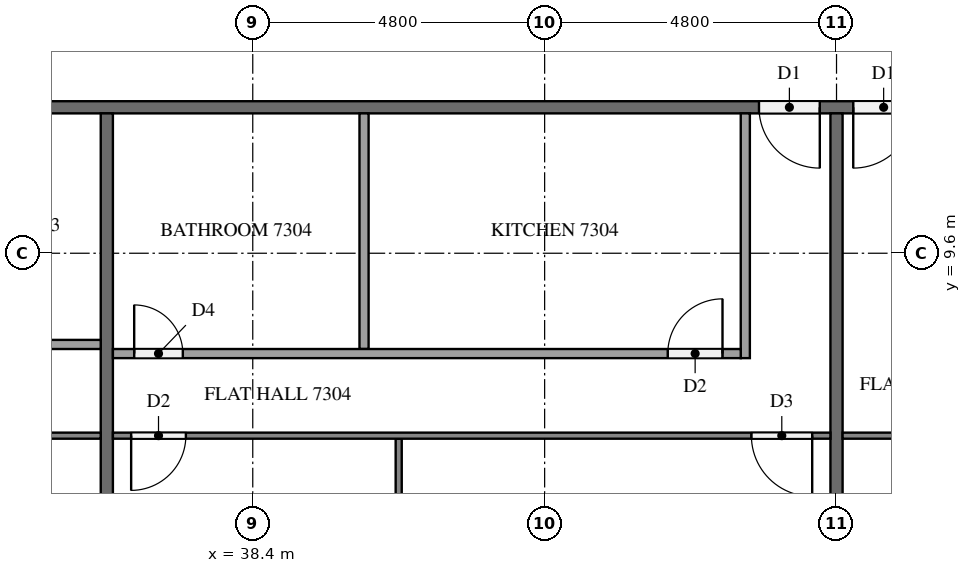
"""IFC4 building model, lengths in metres.
Left out: names, types, materials, properties, quantities, classifications, styles, units other than length and angle.
Written with IfcOpenShell. Run it as: python <this file> out.ifc"""

import sys

from ifc_helpers import new_model, si_unit, direction, frame, frame_2d, origin, place, context, subcontext, project, spatial, rectangle, extrude, element, fill, save


model = new_model("IFC4")
c1 = context("Model", 3, precision=1e-05, world=origin(), true_north=direction((0.0, 1.0)))
c2 = subcontext(c1, "Body", "Model", "MODEL_VIEW")
j1 = project(units=[si_unit("LENGTHUNIT", "METRE"), si_unit("PLANEANGLEUNIT", "RADIAN")], contexts=[c1])
p1 = place(None, origin())
s1 = spatial("IfcSite", under=j1, at=p1, CompositionType="ELEMENT")
p2 = place(p1, origin())
s2 = spatial("IfcBuilding", under=s1, at=p2, CompositionType="ELEMENT")
p3 = place(p2, frame((0.0, 0.0, 279.1)))
s3 = spatial("IfcBuildingStorey", under=s2, at=p3, CompositionType="ELEMENT", Elevation=279.1)
p4 = place(p3, frame((50.5, 12.0, 0.0), z_axis=(0.0, 0.0, 1.0), x_axis=(-1.0, 0.0, 0.0)))
e1 = element("IfcWall", 1, at=p4, inside=s3, PredefinedType="PARTITIONING", context=c2, shape_type="SweptSolid", body=[
    extrude(rectangle(XDim=38.6, YDim=0.2, at=frame_2d((19.3, 0.0))), origin(), (0.0, 0.0, 1.0), 3.2),
])
p5 = place(p4, frame((36.375, 0.0, 0.0)))
e2 = element("IfcOpeningElement", 2, at=p5, cuts=e1, PredefinedType="OPENING", context=c2, shape_type="SweptSolid", body=[
    extrude(rectangle(XDim=1.0, YDim=2.1, at=frame_2d((0.5, 1.05))), frame((0.0, 0.11, 0.0), z_axis=(0.0, -1.0, 0.0), x_axis=(1.0, 0.0, 0.0)), (0.0, 0.0, 1.0), 0.22),
])
p6 = place(p4, frame((29.175, 0.0, 0.0)))
e3 = element("IfcOpeningElement", 3, at=p6, cuts=e1, PredefinedType="OPENING", context=c2, shape_type="SweptSolid", body=[
    extrude(rectangle(XDim=1.0, YDim=2.1, at=frame_2d((0.5, 1.05))), frame((0.0, 0.11, 0.0), z_axis=(0.0, -1.0, 0.0), x_axis=(1.0, 0.0, 0.0)), (0.0, 0.0, 1.0), 0.22),
])
p7 = place(p4, frame((27.625, 0.0, 0.0)))
e4 = element("IfcOpeningElement", 4, at=p7, cuts=e1, PredefinedType="OPENING", context=c2, shape_type="SweptSolid", body=[
    extrude(rectangle(XDim=1.0, YDim=2.1, at=frame_2d((0.5, 1.05))), frame((0.0, 0.11, 0.0), z_axis=(0.0, -1.0, 0.0), x_axis=(1.0, 0.0, 0.0)), (0.0, 0.0, 1.0), 0.22),
])
p8 = place(p4, frame((2.775, 0.0, 0.0)))
e5 = element("IfcOpeningElement", 5, at=p8, cuts=e1, PredefinedType="OPENING", context=c2, shape_type="SweptSolid", body=[
    extrude(rectangle(XDim=1.0, YDim=2.1, at=frame_2d((0.5, 1.05))), frame((0.0, 0.11, 0.0), z_axis=(0.0, -1.0, 0.0), x_axis=(1.0, 0.0, 0.0)), (0.0, 0.0, 1.0), 0.22),
])
p9 = place(p4, frame((1.225, 0.0, 0.0)))
e6 = element("IfcOpeningElement", 6, at=p9, cuts=e1, PredefinedType="OPENING", context=c2, shape_type="SweptSolid", body=[
    extrude(rectangle(XDim=1.0, YDim=2.1, at=frame_2d((0.5, 1.05))), frame((0.0, 0.11, 0.0), z_axis=(0.0, -1.0, 0.0), x_axis=(1.0, 0.0, 0.0)), (0.0, 0.0, 1.0), 0.22),
])
for number, where, z_axis, x_axis in (
    (7, (36.0, 11.9, 0.0), (0.0, 0.0, 1.0), (0.0, -1.0, 0.0)),
    (8, (48.0, 11.9, 0.0), (0.0, 0.0, 1.0), (0.0, -1.0, 0.0)),
):
    element("IfcWall", number, at=place(p3, frame(where, z_axis=z_axis, x_axis=x_axis)), inside=s3, PredefinedType="PARTITIONING", context=c2, shape_type="SweptSolid", body=[
        extrude(rectangle(XDim=11.8, YDim=0.2, at=frame_2d((5.9, 0.0))), origin(), (0.0, 0.0, 1.0), 3.2),
    ])
p10 = place(p3, frame((35.9, 6.6, 0.0), z_axis=(0.0, 0.0, 1.0), x_axis=(-1.0, 0.0, 0.0)))
e9 = element("IfcWall", 9, at=p10, inside=s3, PredefinedType="PARTITIONING", context=c2, shape_type="SweptSolid", body=[
    extrude(rectangle(XDim=14.2, YDim=0.1, at=frame_2d((7.1, 0.0))), origin(), (0.0, 0.0, 1.0), 3.2),
])
p11 = place(p10, frame((13.0, 0.0, 0.0)))
e10 = element("IfcOpeningElement", 10, at=p11, cuts=e9, PredefinedType="OPENING", context=c2, shape_type="SweptSolid", body=[
    extrude(rectangle(XDim=0.9, YDim=2.1, at=frame_2d((0.45, 1.05))), frame((0.0, 0.06, 0.0), z_axis=(0.0, -1.0, 0.0), x_axis=(1.0, 0.0, 0.0)), (0.0, 0.0, 1.0), 0.12),
])
p12 = place(p10, frame((5.05, 0.0, 0.0)))
e11 = element("IfcOpeningElement", 11, at=p12, cuts=e9, PredefinedType="OPENING", context=c2, shape_type="SweptSolid", body=[
    extrude(rectangle(XDim=1.0, YDim=2.1, at=frame_2d((0.5, 1.05))), frame((0.0, 0.06, 0.0), z_axis=(0.0, -1.0, 0.0), x_axis=(1.0, 0.0, 0.0)), (0.0, 0.0, 1.0), 0.12),
])
p13 = place(p10, frame((3.45, 0.0, 0.0)))
e12 = element("IfcOpeningElement", 12, at=p13, cuts=e9, PredefinedType="OPENING", context=c2, shape_type="SweptSolid", body=[
    extrude(rectangle(XDim=0.9, YDim=2.1, at=frame_2d((0.45, 1.05))), frame((0.0, 0.06, 0.0), z_axis=(0.0, -1.0, 0.0), x_axis=(1.0, 0.0, 0.0)), (0.0, 0.0, 1.0), 0.12),
])
p14 = place(p3, frame((23.175, 8.1, 0.0), z_axis=(0.0, 0.0, 1.0), x_axis=(1.0, 0.0, 0.0)))
e13 = element("IfcWall", 13, at=p14, inside=s3, PredefinedType="PARTITIONING", context=c2, shape_type="SweptSolid", body=[
    extrude(rectangle(XDim=12.725, YDim=0.15, at=frame_2d((6.362, 0.0))), origin(), (0.0, 0.0, 1.0), 3.2),
])
p15 = place(p14, frame((0.3, 0.0, 0.0)))
e14 = element("IfcOpeningElement", 14, at=p15, cuts=e13, PredefinedType="OPENING", context=c2, shape_type="SweptSolid", body=[
    extrude(rectangle(XDim=0.8, YDim=2.1, at=frame_2d((0.4, 1.05))), frame((0.0, 0.085, 0.0), z_axis=(0.0, -1.0, 0.0), x_axis=(1.0, 0.0, 0.0)), (0.0, 0.0, 1.0), 0.17),
])
p16 = place(p14, frame((7.585, 0.0, 0.0)))
e15 = element("IfcOpeningElement", 15, at=p16, cuts=e13, PredefinedType="OPENING", context=c2, shape_type="SweptSolid", body=[
    extrude(rectangle(XDim=0.9, YDim=2.1, at=frame_2d((0.45, 1.05))), frame((0.0, 0.085, 0.0), z_axis=(0.0, -1.0, 0.0), x_axis=(1.0, 0.0, 0.0)), (0.0, 0.0, 1.0), 0.17),
])
p17 = place(p14, frame((9.135, 0.0, 0.0)))
e16 = element("IfcOpeningElement", 16, at=p17, cuts=e13, PredefinedType="OPENING", context=c2, shape_type="SweptSolid", body=[
    extrude(rectangle(XDim=0.9, YDim=2.1, at=frame_2d((0.45, 1.05))), frame((0.0, 0.085, 0.0), z_axis=(0.0, -1.0, 0.0), x_axis=(1.0, 0.0, 0.0)), (0.0, 0.0, 1.0), 0.17),
])
p18 = place(p3, frame((40.8, 6.55, 0.0), z_axis=(0.0, 0.0, 1.0), x_axis=(0.0, -1.0, 0.0)))
e17 = element("IfcWall", 17, at=p18, inside=s3, PredefinedType="PARTITIONING", context=c2, shape_type="SweptSolid", body=[
    extrude(rectangle(XDim=6.45, YDim=0.1, at=frame_2d((3.225, 0.0))), origin(), (0.0, 0.0, 1.0), 3.2),
])
p19 = place(p3, frame((47.9, 6.6, 0.0), z_axis=(0.0, 0.0, 1.0), x_axis=(-1.0, 0.0, 0.0)))
e18 = element("IfcWall", 18, at=p19, inside=s3, PredefinedType="PARTITIONING", context=c2, shape_type="SweptSolid", body=[
    extrude(rectangle(XDim=11.8, YDim=0.1, at=frame_2d((5.9, 0.0))), origin(), (0.0, 0.0, 1.0), 3.2),
])
p20 = place(p19, frame((0.3, 0.0, 0.0)))
e19 = element("IfcOpeningElement", 19, at=p20, cuts=e18, PredefinedType="OPENING", context=c2, shape_type="SweptSolid", body=[
    extrude(rectangle(XDim=1.0, YDim=2.1, at=frame_2d((0.5, 1.05))), frame((0.0, 0.06, 0.0), z_axis=(0.0, -1.0, 0.0), x_axis=(1.0, 0.0, 0.0)), (0.0, 0.0, 1.0), 0.12),
])
p21 = place(p19, frame((10.6, 0.0, 0.0)))
e20 = element("IfcOpeningElement", 20, at=p21, cuts=e18, PredefinedType="OPENING", context=c2, shape_type="SweptSolid", body=[
    extrude(rectangle(XDim=0.9, YDim=2.1, at=frame_2d((0.45, 1.05))), frame((0.0, 0.06, 0.0), z_axis=(0.0, -1.0, 0.0), x_axis=(1.0, 0.0, 0.0)), (0.0, 0.0, 1.0), 0.12),
])
p22 = place(p3, frame((40.23, 11.9, 0.0), z_axis=(0.0, 0.0, 1.0), x_axis=(0.0, -1.0, 0.0)))
e21 = element("IfcWall", 21, at=p22, inside=s3, PredefinedType="PARTITIONING", context=c2, shape_type="SweptSolid", body=[
    extrude(rectangle(XDim=3.875, YDim=0.15, at=frame_2d((1.938, 0.0))), origin(), (0.0, 0.0, 1.0), 3.2),
])
p23 = place(p3, frame((46.5, 11.9, 0.0), z_axis=(0.0, 0.0, 1.0), x_axis=(0.0, -1.0, 0.0)))
e22 = element("IfcWall", 22, at=p23, inside=s3, PredefinedType="PARTITIONING", context=c2, shape_type="SweptSolid", body=[
    extrude(rectangle(XDim=4.025, YDim=0.15, at=frame_2d((2.012, 0.0))), origin(), (0.0, 0.0, 1.0), 3.2),
])
p24 = place(p3, frame((36.1, 7.95, 0.0), z_axis=(0.0, 0.0, 1.0), x_axis=(1.0, 0.0, 0.0)))
e23 = element("IfcWall", 23, at=p24, inside=s3, PredefinedType="PARTITIONING", context=c2, shape_type="SweptSolid", body=[
    extrude(rectangle(XDim=10.325, YDim=0.15, at=frame_2d((5.163, 0.0))), origin(), (0.0, 0.0, 1.0), 3.2),
])
p25 = place(p24, frame((9.125, 0.0, 0.0)))
e24 = element("IfcOpeningElement", 24, at=p25, cuts=e23, PredefinedType="OPENING", context=c2, shape_type="SweptSolid", body=[
    extrude(rectangle(XDim=0.9, YDim=2.1, at=frame_2d((0.45, 1.05))), frame((0.0, 0.085, 0.0), z_axis=(0.0, -1.0, 0.0), x_axis=(1.0, 0.0, 0.0)), (0.0, 0.0, 1.0), 0.17),
])
p26 = place(p24, frame((0.35, 0.0, 0.0)))
e25 = element("IfcOpeningElement", 25, at=p26, cuts=e23, PredefinedType="OPENING", context=c2, shape_type="SweptSolid", body=[
    extrude(rectangle(XDim=0.8, YDim=2.1, at=frame_2d((0.4, 1.05))), frame((0.0, 0.085, 0.0), z_axis=(0.0, -1.0, 0.0), x_axis=(1.0, 0.0, 0.0)), (0.0, 0.0, 1.0), 0.17),
])
p27 = place(p3, frame((57.5, 6.6, 0.0), z_axis=(0.0, 0.0, 1.0), x_axis=(-1.0, 0.0, 0.0)))
e26 = element("IfcWall", 26, at=p27, inside=s3, PredefinedType="PARTITIONING", context=c2, shape_type="SweptSolid", body=[
    extrude(rectangle(XDim=9.4, YDim=0.1, at=frame_2d((4.7, 0.0))), origin(), (0.0, 0.0, 1.0), 3.2),
])
p28 = place(p27, frame((5.05, 0.0, 0.0)))
e27 = element("IfcOpeningElement", 27, at=p28, cuts=e26, PredefinedType="OPENING", context=c2, shape_type="SweptSolid", body=[
    extrude(rectangle(XDim=1.0, YDim=2.1, at=frame_2d((0.5, 1.05))), frame((0.0, 0.06, 0.0), z_axis=(0.0, -1.0, 0.0), x_axis=(1.0, 0.0, 0.0)), (0.0, 0.0, 1.0), 0.12),
])
p29 = place(p27, frame((3.45, 0.0, 0.0)))
e28 = element("IfcOpeningElement", 28, at=p29, cuts=e26, PredefinedType="OPENING", context=c2, shape_type="SweptSolid", body=[
    extrude(rectangle(XDim=0.9, YDim=2.1, at=frame_2d((0.45, 1.05))), frame((0.0, 0.06, 0.0), z_axis=(0.0, -1.0, 0.0), x_axis=(1.0, 0.0, 0.0)), (0.0, 0.0, 1.0), 0.12),
])
p30 = place(p8, origin())
e29 = element("IfcDoor", 29, at=p30, inside=s3, OperationType="SINGLE_SWING_LEFT", PredefinedType="DOOR", context=c2, shape_type="SweptSolid", body=[
    extrude(rectangle(XDim=1.0, YDim=2.1, at=frame_2d((0.5, 1.05))), frame((0.0, 0.025, 0.0), z_axis=(0.0, -1.0, 0.0), x_axis=(1.0, 0.0, 0.0)), (0.0, 0.0, 1.0), 0.05),
])
fill(e5, e29)
p31 = place(p9, origin())
e30 = element("IfcDoor", 30, at=p31, inside=s3, OperationType="SINGLE_SWING_RIGHT", PredefinedType="DOOR", context=c2, shape_type="SweptSolid", body=[
    extrude(rectangle(XDim=1.0, YDim=2.1, at=frame_2d((0.5, 1.05))), frame((0.0, 0.025, 0.0), z_axis=(0.0, -1.0, 0.0), x_axis=(1.0, 0.0, 0.0)), (0.0, 0.0, 1.0), 0.05),
])
fill(e6, e30)
p32 = place(p20, origin())
e31 = element("IfcDoor", 31, at=p32, inside=s3, OperationType="SINGLE_SWING_LEFT", PredefinedType="DOOR", context=c2, shape_type="SweptSolid", body=[
    extrude(rectangle(XDim=1.0, YDim=2.1, at=frame_2d((0.5, 1.05))), frame((0.0, 0.025, 0.0), z_axis=(0.0, -1.0, 0.0), x_axis=(1.0, 0.0, 0.0)), (0.0, 0.0, 1.0), 0.05),
])
fill(e19, e31)
p33 = place(p21, origin())
e32 = element("IfcDoor", 32, at=p33, inside=s3, OperationType="SINGLE_SWING_RIGHT", PredefinedType="DOOR", context=c2, shape_type="SweptSolid", body=[
    extrude(rectangle(XDim=0.9, YDim=2.1, at=frame_2d((0.45, 1.05))), frame((0.0, 0.025, 0.0), z_axis=(0.0, -1.0, 0.0), x_axis=(1.0, 0.0, 0.0)), (0.0, 0.0, 1.0), 0.05),
])
fill(e20, e32)
p34 = place(p25, origin())
e33 = element("IfcDoor", 33, at=p34, inside=s3, OperationType="SINGLE_SWING_RIGHT", PredefinedType="DOOR", context=c2, shape_type="SweptSolid", body=[
    extrude(rectangle(XDim=0.9, YDim=2.1, at=frame_2d((0.45, 1.05))), frame((0.0, 0.025, 0.0), z_axis=(0.0, -1.0, 0.0), x_axis=(1.0, 0.0, 0.0)), (0.0, 0.0, 1.0), 0.05),
])
fill(e24, e33)
p35 = place(p26, origin())
e34 = element("IfcDoor", 34, at=p35, inside=s3, OperationType="SINGLE_SWING_LEFT", PredefinedType="DOOR", context=c2, shape_type="SweptSolid", body=[
    extrude(rectangle(XDim=0.8, YDim=2.1, at=frame_2d((0.4, 1.05))), frame((0.0, 0.025, 0.0), z_axis=(0.0, -1.0, 0.0), x_axis=(1.0, 0.0, 0.0)), (0.0, 0.0, 1.0), 0.05),
])
fill(e25, e34)
save(model, sys.argv[1])
